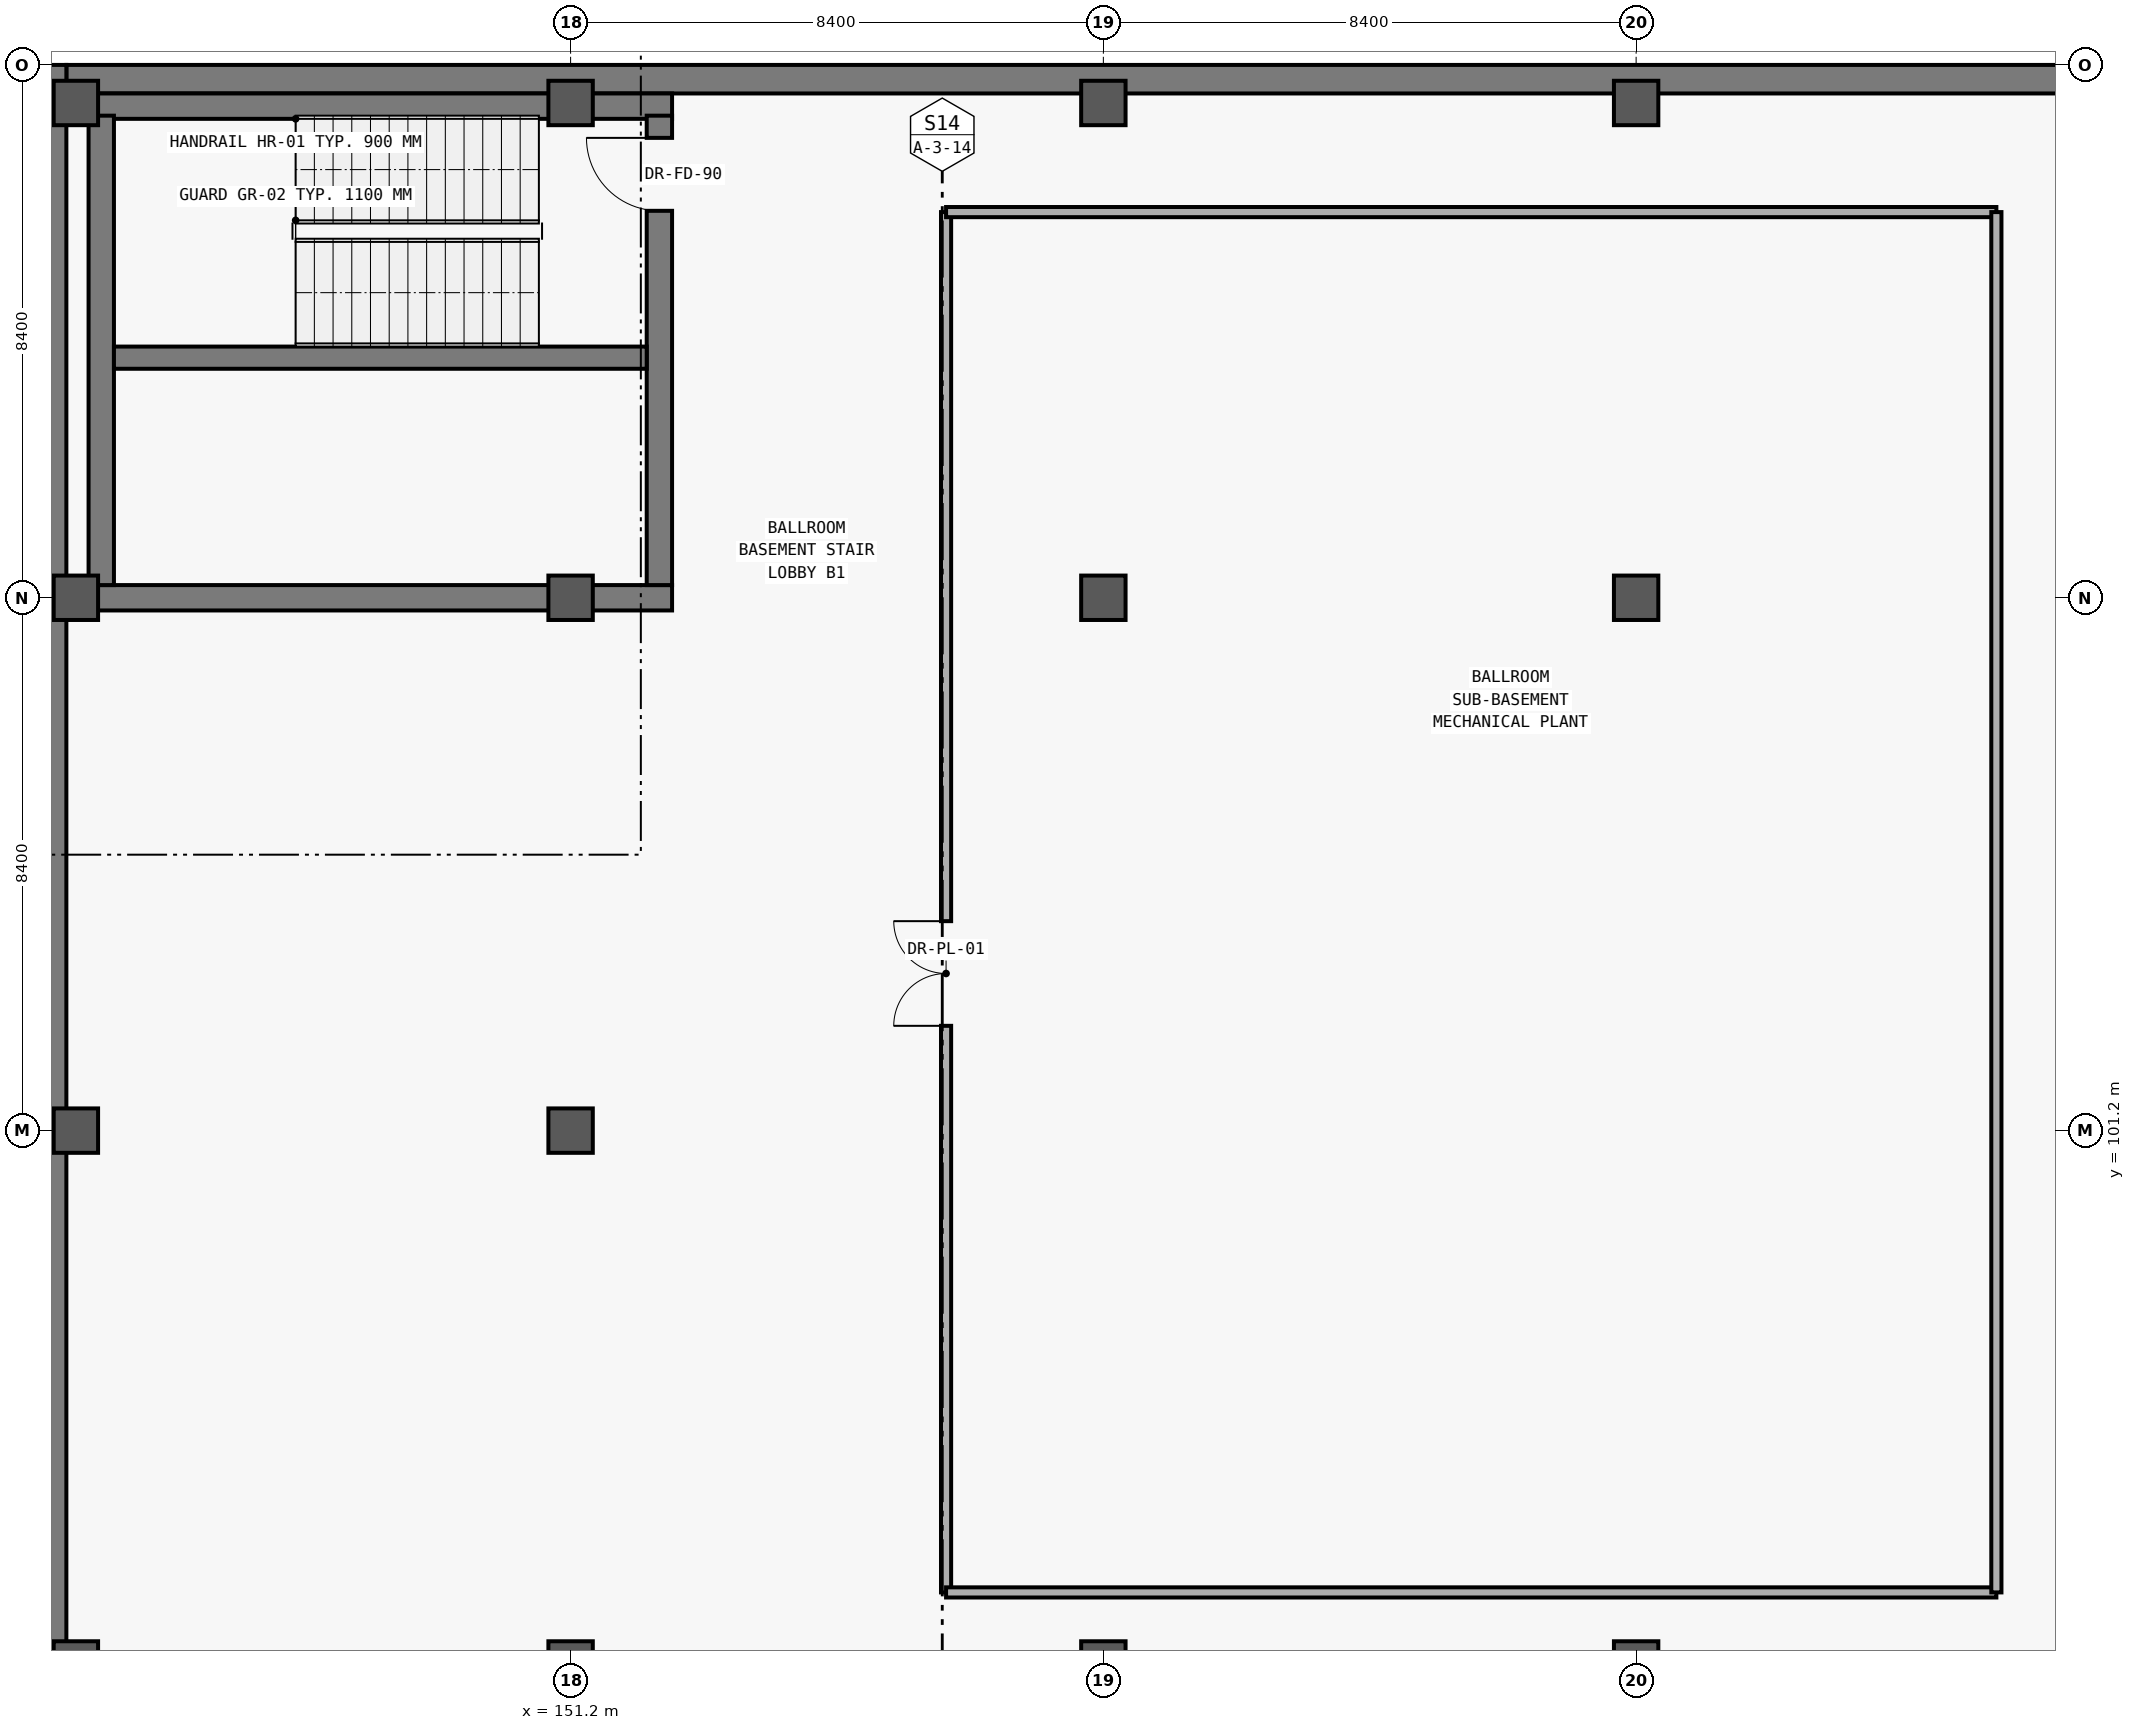
"""IFC4 building model, lengths in metres.
Left out: names, types, materials, properties, quantities, classifications, styles, units other than length and angle.
Written with IfcOpenShell. Run it as: python <this file> out.ifc"""

import sys

from ifc_helpers import new_model, si_unit, direction, frame, frame_2d, origin, origin_2d, place, context, subcontext, project, spatial, rectangle, extrude, element, fill, save


model = new_model("IFC4")
c1 = context("Model", 3, precision=1e-05, world=origin(), true_north=direction((0.0, 1.0)))
c2 = subcontext(c1, "Body", "Model", "MODEL_VIEW")
j1 = project(units=[si_unit("LENGTHUNIT", "METRE"), si_unit("PLANEANGLEUNIT", "RADIAN")], contexts=[c1])
p1 = place(None, origin())
s1 = spatial("IfcSite", under=j1, at=p1, CompositionType="ELEMENT")
p2 = place(p1, origin())
s2 = spatial("IfcBuilding", under=s1, at=p2, CompositionType="ELEMENT")
p3 = place(p2, frame((0.0, 0.0, -4.8)))
s3 = spatial("IfcBuildingStorey", under=s2, at=p3, CompositionType="ELEMENT", Elevation=-4.8)
p4 = place(p3, frame((143.25, 117.775, 0.0), z_axis=(0.0, 0.0, 1.0), x_axis=(1.0, 0.0, 0.0)))
e1 = element("IfcWall", 1, at=p4, inside=s3, PredefinedType="USERDEFINED", context=c2, shape_type="SweptSolid", body=[
    extrude(rectangle(XDim=49.5, YDim=0.45, at=frame_2d((24.75, 0.0))), origin(), (0.0, 0.0, 1.0), 4.48),
])
p5 = place(p3, frame((143.025, 84.4, 0.0), z_axis=(0.0, 0.0, 1.0), x_axis=(0.0, 1.0, 0.0)))
e2 = element("IfcWall", 2, at=p5, inside=s3, PredefinedType="USERDEFINED", context=c2, shape_type="SweptSolid", body=[
    extrude(rectangle(XDim=33.6, YDim=0.45, at=frame_2d((16.8, 0.0))), origin(), (0.0, 0.0, 1.0), 4.48),
])
for number, where, z_axis, x_axis in (
    (3, (143.4, 92.8, 0.0), (0.0, 0.0, 1.0), (1.0, 0.0, 0.0)),
    (4, (143.4, 101.2, 0.0), (0.0, 0.0, 1.0), (1.0, 0.0, 0.0)),
    (5, (143.4, 109.6, 0.0), (0.0, 0.0, 1.0), (1.0, 0.0, 0.0)),
    (6, (143.4, 117.4, 0.0), (0.0, 0.0, 1.0), (1.0, 0.0, 0.0)),
    (7, (151.2, 92.8, 0.0), (0.0, 0.0, 1.0), (1.0, 0.0, 0.0)),
    (8, (151.2, 101.2, 0.0), (0.0, 0.0, 1.0), (1.0, 0.0, 0.0)),
    (9, (151.2, 109.6, 0.0), (0.0, 0.0, 1.0), (1.0, 0.0, 0.0)),
    (10, (151.2, 117.4, 0.0), (0.0, 0.0, 1.0), (1.0, 0.0, 0.0)),
    (11, (159.6, 92.8, 0.0), (0.0, 0.0, 1.0), (1.0, 0.0, 0.0)),
    (12, (159.6, 109.6, 0.0), (0.0, 0.0, 1.0), (1.0, 0.0, 0.0)),
    (13, (159.6, 117.4, 0.0), (0.0, 0.0, 1.0), (1.0, 0.0, 0.0)),
    (14, (168.0, 92.8, 0.0), (0.0, 0.0, 1.0), (1.0, 0.0, 0.0)),
    (15, (168.0, 109.6, 0.0), (0.0, 0.0, 1.0), (1.0, 0.0, 0.0)),
    (16, (168.0, 117.4, 0.0), (0.0, 0.0, 1.0), (1.0, 0.0, 0.0)),
):
    element("IfcColumn", number, at=place(p3, frame(where, z_axis=z_axis, x_axis=x_axis)), inside=s3, PredefinedType="COLUMN", context=c2, shape_type="SweptSolid", body=[
        extrude(rectangle(XDim=0.7, YDim=0.7, at=origin_2d()), origin(), (0.0, 0.0, 1.0), 4.8),
    ])
for number, where, z_axis, x_axis in (
    (17, (143.6, 109.6, 0.0), (0.0, 0.0, 1.0), (1.0, 0.0, 0.0)),
    (18, (152.8, 117.35, 0.0), (0.0, 0.0, 1.0), (-1.0, 0.0, 0.0)),
):
    element("IfcWall", number, at=place(p3, frame(where, z_axis=z_axis, x_axis=x_axis)), inside=s3, PredefinedType="SHEAR", context=c2, shape_type="SweptSolid", body=[
        extrude(rectangle(XDim=9.2, YDim=0.4, at=frame_2d((4.6, 0.0))), origin(), (0.0, 0.0, 1.0), 4.48),
    ])
p6 = place(p3, frame((143.8, 117.2, 0.0), z_axis=(0.0, 0.0, 1.0), x_axis=(0.0, -1.0, 0.0)))
e19 = element("IfcWall", 19, at=p6, inside=s3, PredefinedType="SHEAR", context=c2, shape_type="SweptSolid", body=[
    extrude(rectangle(XDim=7.4, YDim=0.4, at=frame_2d((3.7, 0.0))), origin(), (0.0, 0.0, 1.0), 4.48),
])
p7 = place(p3, frame((152.6, 109.8, 0.0), z_axis=(0.0, 0.0, 1.0), x_axis=(0.0, 1.0, 0.0)))
e20 = element("IfcWall", 20, at=p7, inside=s3, PredefinedType="SHEAR", context=c2, shape_type="SweptSolid", body=[
    extrude(rectangle(XDim=7.4, YDim=0.4, at=frame_2d((3.7, 0.0))), origin(), (0.0, 0.0, 1.0), 4.48),
])
p8 = place(p7, frame((5.9, 0.0, 0.0)))
e21 = element("IfcOpeningElement", 21, at=p8, cuts=e20, PredefinedType="OPENING", context=c2, shape_type="SweptSolid", body=[
    extrude(rectangle(XDim=1.15, YDim=2.2, at=frame_2d((0.575, 1.1))), frame((0.0, 0.21, 0.0), z_axis=(0.0, -1.0, 0.0), x_axis=(1.0, 0.0, 0.0)), (0.0, 0.0, 1.0), 0.42),
])
p9 = place(p3, frame((144.0, 113.385, 0.0), z_axis=(0.0, 0.0, 1.0), x_axis=(1.0, 0.0, 0.0)))
e22 = element("IfcWall", 22, at=p9, inside=s3, PredefinedType="SHEAR", context=c2, shape_type="SweptSolid", body=[
    extrude(rectangle(XDim=8.4, YDim=0.35, at=frame_2d((4.2, 0.0))), origin(), (0.0, 0.0, 1.0), 4.48),
])
p10 = place(p3, frame((157.12, 93.92, 0.0), z_axis=(0.0, 0.0, 1.0), x_axis=(0.0, 1.0, 0.0)))
e23 = element("IfcWall", 23, at=p10, inside=s3, PredefinedType="PARTITIONING", context=c2, shape_type="SweptSolid", body=[
    extrude(rectangle(XDim=21.76, YDim=0.16, at=frame_2d((10.88, 0.0))), origin(), (0.0, 0.0, 1.0), 3.58),
])
p11 = place(p10, frame((8.932, 0.0, 0.0)))
e24 = element("IfcOpeningElement", 24, at=p11, cuts=e23, PredefinedType="OPENING", context=c2, shape_type="SweptSolid", body=[
    extrude(rectangle(XDim=1.65, YDim=2.35, at=frame_2d((0.825, 1.175))), frame((0.0, 0.09, 0.0), z_axis=(0.0, -1.0, 0.0), x_axis=(1.0, 0.0, 0.0)), (0.0, 0.0, 1.0), 0.18),
])
for number, where, z_axis, x_axis in (
    (25, (157.12, 93.92, 0.0), (0.0, 0.0, 1.0), (1.0, 0.0, 0.0)),
    (26, (157.12, 115.68, 0.0), (0.0, 0.0, 1.0), (1.0, 0.0, 0.0)),
):
    element("IfcWall", number, at=place(p3, frame(where, z_axis=z_axis, x_axis=x_axis)), inside=s3, PredefinedType="PARTITIONING", context=c2, shape_type="SweptSolid", body=[
        extrude(rectangle(XDim=16.56, YDim=0.16, at=frame_2d((8.28, 0.0))), origin(), (0.0, 0.0, 1.0), 3.58),
    ])
p12 = place(p3, frame((173.68, 93.92, 0.0), z_axis=(0.0, 0.0, 1.0), x_axis=(0.0, 1.0, 0.0)))
e27 = element("IfcWall", 27, at=p12, inside=s3, PredefinedType="PARTITIONING", context=c2, shape_type="SweptSolid", body=[
    extrude(rectangle(XDim=21.76, YDim=0.16, at=frame_2d((10.88, 0.0))), origin(), (0.0, 0.0, 1.0), 3.58),
])
p13 = place(p8, origin())
e28 = element("IfcDoor", 28, at=p13, inside=s3, OperationType="SINGLE_SWING_RIGHT", PredefinedType="DOOR", context=c2, shape_type="SweptSolid", body=[
    extrude(rectangle(XDim=1.15, YDim=2.2, at=frame_2d((0.575, 1.1))), frame((0.0, 0.025, 0.0), z_axis=(0.0, -1.0, 0.0), x_axis=(1.0, 0.0, 0.0)), (0.0, 0.0, 1.0), 0.05),
])
fill(e21, e28)
p14 = place(p11, origin())
e29 = element("IfcDoor", 29, at=p14, inside=s3, OperationType="DOUBLE_DOOR_SINGLE_SWING", PredefinedType="DOOR", context=c2, shape_type="SweptSolid", body=[
    extrude(rectangle(XDim=1.65, YDim=2.35, at=frame_2d((0.825, 1.175))), frame((0.0, 0.025, 0.0), z_axis=(0.0, -1.0, 0.0), x_axis=(1.0, 0.0, 0.0)), (0.0, 0.0, 1.0), 0.05),
])
fill(e24, e29)
save(model, sys.argv[1])
